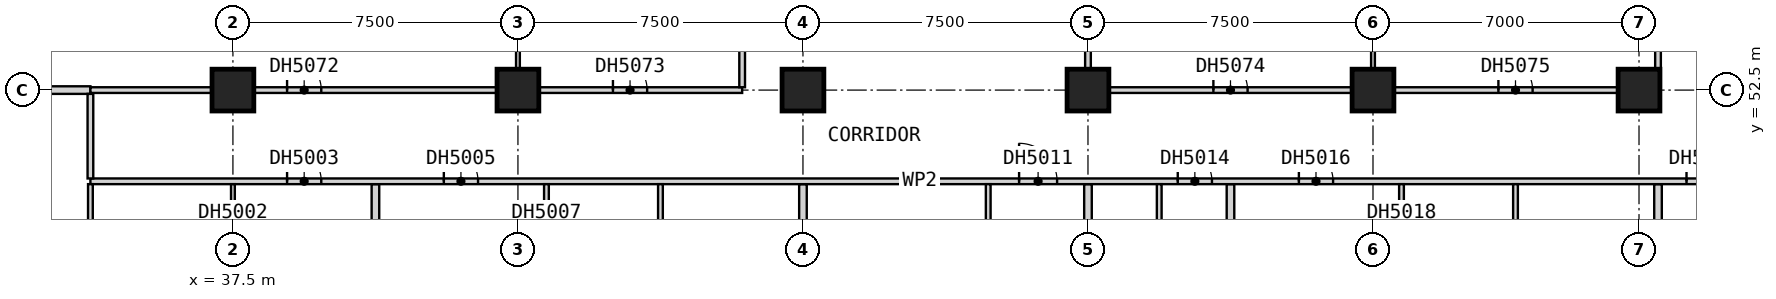
"""IFC4 building model, lengths in metres.
Left out: names, types, materials, properties, quantities, classifications, styles, units other than length and angle.
Written with IfcOpenShell. Run it as: python <this file> out.ifc"""

import sys

from ifc_helpers import new_model, si_unit, direction, frame, frame_2d, origin, origin_2d, place, context, subcontext, project, spatial, rectangle, extrude, element, fill, save


model = new_model("IFC4")
c1 = context("Model", 3, precision=1e-05, world=origin(), true_north=direction((0.0, 1.0)))
c2 = subcontext(c1, "Body", "Model", "MODEL_VIEW")
j1 = project(units=[si_unit("LENGTHUNIT", "METRE"), si_unit("PLANEANGLEUNIT", "RADIAN")], contexts=[c1])
p1 = place(None, origin())
s1 = spatial("IfcSite", under=j1, at=p1, CompositionType="ELEMENT")
p2 = place(p1, origin())
s2 = spatial("IfcBuilding", under=s1, at=p2, CompositionType="ELEMENT")
p3 = place(p2, frame((0.0, 0.0, 79.1)))
s3 = spatial("IfcBuildingStorey", under=s2, at=p3, CompositionType="ELEMENT", Elevation=79.1)
for number, where, z_axis, x_axis in (
    (1, (37.5, 52.5, 0.0), (0.0, 0.0, 1.0), (1.0, 0.0, 0.0)),
    (2, (45.0, 52.5, 0.0), (0.0, 0.0, 1.0), (1.0, 0.0, 0.0)),
    (3, (52.5, 52.5, 0.0), (0.0, 0.0, 1.0), (1.0, 0.0, 0.0)),
    (4, (60.0, 52.5, 0.0), (0.0, 0.0, 1.0), (1.0, 0.0, 0.0)),
    (5, (67.5, 52.5, 0.0), (0.0, 0.0, 1.0), (1.0, 0.0, 0.0)),
    (6, (74.5, 52.5, 0.0), (0.0, 0.0, 1.0), (1.0, 0.0, 0.0)),
):
    element("IfcColumn", number, at=place(p3, frame(where, z_axis=z_axis, x_axis=x_axis)), inside=s3, PredefinedType="COLUMN", context=c2, shape_type="SweptSolid", body=[
        extrude(rectangle(XDim=1.1, YDim=1.1, at=origin_2d()), origin(), (0.0, 0.0, 1.0), 3.6),
    ])
p4 = place(p3, frame((30.0, 52.5, 0.0), z_axis=(0.0, 0.0, 1.0), x_axis=(1.0, 0.0, 0.0)))
e7 = element("IfcWall", 7, at=p4, inside=s3, PredefinedType="PARTITIONING", context=c2, shape_type="SweptSolid", body=[
    extrude(rectangle(XDim=3.75, YDim=0.2, at=frame_2d((1.875, 0.0))), origin(), (0.0, 0.0, 1.0), 3.35),
])
p5 = place(p3, frame((41.25, 38.31, 0.0), z_axis=(0.0, 0.0, 1.0), x_axis=(0.0, 1.0, 0.0)))
e8 = element("IfcWall", 8, at=p5, inside=s3, PredefinedType="PARTITIONING", context=c2, shape_type="SweptSolid", body=[
    extrude(rectangle(XDim=11.715, YDim=0.2, at=frame_2d((5.857, 0.0))), origin(), (0.0, 0.0, 1.0), 3.35),
])
for number, where, z_axis, x_axis in (
    (9, (52.5, 37.5, 0.0), (0.0, 0.0, 1.0), (0.0, 1.0, 0.0)),
    (10, (60.0, 37.5, 0.0), (0.0, 0.0, 1.0), (0.0, 1.0, 0.0)),
):
    element("IfcWall", number, at=place(p3, frame(where, z_axis=z_axis, x_axis=x_axis)), inside=s3, PredefinedType="PARTITIONING", context=c2, shape_type="SweptSolid", body=[
        extrude(rectangle(XDim=12.525, YDim=0.2, at=frame_2d((6.262, 0.0))), origin(), (0.0, 0.0, 1.0), 3.35),
    ])
for number, where, z_axis, x_axis in (
    (11, (63.75, 38.31, 0.0), (0.0, 0.0, 1.0), (0.0, 1.0, 0.0)),
    (12, (75.0, 38.31, 0.0), (0.0, 0.0, 1.0), (0.0, 1.0, 0.0)),
):
    element("IfcWall", number, at=place(p3, frame(where, z_axis=z_axis, x_axis=x_axis)), inside=s3, PredefinedType="PARTITIONING", context=c2, shape_type="SweptSolid", body=[
        extrude(rectangle(XDim=11.715, YDim=0.2, at=frame_2d((5.857, 0.0))), origin(), (0.0, 0.0, 1.0), 3.35),
    ])
p6 = place(p3, frame((33.75, 50.1, 0.0), z_axis=(0.0, 0.0, 1.0), x_axis=(1.0, 0.0, 0.0)))
e13 = element("IfcWall", 13, at=p6, inside=s3, PredefinedType="PARTITIONING", context=c2, shape_type="SweptSolid", body=[
    extrude(rectangle(XDim=43.65, YDim=0.15, at=frame_2d((21.825, 0.0))), origin(), (0.0, 0.0, 1.0), 3.35),
])
p7 = place(p6, frame((5.175, 0.0, 0.0)))
e14 = element("IfcOpeningElement", 14, at=p7, cuts=e13, PredefinedType="OPENING", context=c2, shape_type="SweptSolid", body=[
    extrude(rectangle(XDim=0.9, YDim=2.1, at=frame_2d((0.45, 1.05))), frame((0.0, 0.085, 0.0), z_axis=(0.0, -1.0, 0.0), x_axis=(1.0, 0.0, 0.0)), (0.0, 0.0, 1.0), 0.17),
])
p8 = place(p6, frame((9.3, 0.0, 0.0)))
e15 = element("IfcOpeningElement", 15, at=p8, cuts=e13, PredefinedType="OPENING", context=c2, shape_type="SweptSolid", body=[
    extrude(rectangle(XDim=0.9, YDim=2.1, at=frame_2d((0.45, 1.05))), frame((0.0, 0.085, 0.0), z_axis=(0.0, -1.0, 0.0), x_axis=(1.0, 0.0, 0.0)), (0.0, 0.0, 1.0), 0.17),
])
p9 = place(p6, frame((24.438, 0.0, 0.0)))
e16 = element("IfcOpeningElement", 16, at=p9, cuts=e13, PredefinedType="OPENING", context=c2, shape_type="SweptSolid", body=[
    extrude(rectangle(XDim=1.0, YDim=2.1, at=frame_2d((0.5, 1.05))), frame((0.0, 0.085, 0.0), z_axis=(0.0, -1.0, 0.0), x_axis=(1.0, 0.0, 0.0)), (0.0, 0.0, 1.0), 0.17),
])
p10 = place(p6, frame((28.613, 0.0, 0.0)))
e17 = element("IfcOpeningElement", 17, at=p10, cuts=e13, PredefinedType="OPENING", context=c2, shape_type="SweptSolid", body=[
    extrude(rectangle(XDim=0.9, YDim=2.1, at=frame_2d((0.45, 1.05))), frame((0.0, 0.085, 0.0), z_axis=(0.0, -1.0, 0.0), x_axis=(1.0, 0.0, 0.0)), (0.0, 0.0, 1.0), 0.17),
])
p11 = place(p6, frame((31.8, 0.0, 0.0)))
e18 = element("IfcOpeningElement", 18, at=p11, cuts=e13, PredefinedType="OPENING", context=c2, shape_type="SweptSolid", body=[
    extrude(rectangle(XDim=0.9, YDim=2.1, at=frame_2d((0.45, 1.05))), frame((0.0, 0.085, 0.0), z_axis=(0.0, -1.0, 0.0), x_axis=(1.0, 0.0, 0.0)), (0.0, 0.0, 1.0), 0.17),
])
p12 = place(p6, frame((42.0, 0.0, 0.0)))
e19 = element("IfcOpeningElement", 19, at=p12, cuts=e13, PredefinedType="OPENING", context=c2, shape_type="SweptSolid", body=[
    extrude(rectangle(XDim=0.9, YDim=2.1, at=frame_2d((0.45, 1.05))), frame((0.0, 0.085, 0.0), z_axis=(0.0, -1.0, 0.0), x_axis=(1.0, 0.0, 0.0)), (0.0, 0.0, 1.0), 0.17),
])
p13 = place(p3, frame((33.75, 52.5, 0.0), z_axis=(0.0, 0.0, 1.0), x_axis=(1.0, 0.0, 0.0)))
e20 = element("IfcWall", 20, at=p13, inside=s3, PredefinedType="PARTITIONING", context=c2, shape_type="SweptSolid", body=[
    extrude(rectangle(XDim=17.15, YDim=0.15, at=frame_2d((8.575, 0.0))), origin(), (0.0, 0.0, 1.0), 3.35),
])
p14 = place(p13, frame((5.175, 0.0, 0.0)))
e21 = element("IfcOpeningElement", 21, at=p14, cuts=e20, PredefinedType="OPENING", context=c2, shape_type="SweptSolid", body=[
    extrude(rectangle(XDim=0.9, YDim=2.1, at=frame_2d((0.45, 1.05))), frame((0.0, 0.085, 0.0), z_axis=(0.0, -1.0, 0.0), x_axis=(1.0, 0.0, 0.0)), (0.0, 0.0, 1.0), 0.17),
])
p15 = place(p13, frame((13.75, 0.0, 0.0)))
e22 = element("IfcOpeningElement", 22, at=p15, cuts=e20, PredefinedType="OPENING", context=c2, shape_type="SweptSolid", body=[
    extrude(rectangle(XDim=0.9, YDim=2.1, at=frame_2d((0.45, 1.05))), frame((0.0, 0.085, 0.0), z_axis=(0.0, -1.0, 0.0), x_axis=(1.0, 0.0, 0.0)), (0.0, 0.0, 1.0), 0.17),
])
p16 = place(p3, frame((60.0, 52.5, 0.0), z_axis=(0.0, 0.0, 1.0), x_axis=(1.0, 0.0, 0.0)))
e23 = element("IfcWall", 23, at=p16, inside=s3, PredefinedType="PARTITIONING", context=c2, shape_type="SweptSolid", body=[
    extrude(rectangle(XDim=15.0, YDim=0.15, at=frame_2d((7.5, 0.0))), origin(), (0.0, 0.0, 1.0), 3.35),
])
p17 = place(p16, frame((3.3, 0.0, 0.0)))
e24 = element("IfcOpeningElement", 24, at=p17, cuts=e23, PredefinedType="OPENING", context=c2, shape_type="SweptSolid", body=[
    extrude(rectangle(XDim=0.9, YDim=2.1, at=frame_2d((0.45, 1.05))), frame((0.0, 0.085, 0.0), z_axis=(0.0, -1.0, 0.0), x_axis=(1.0, 0.0, 0.0)), (0.0, 0.0, 1.0), 0.17),
])
p18 = place(p16, frame((10.8, 0.0, 0.0)))
e25 = element("IfcOpeningElement", 25, at=p18, cuts=e23, PredefinedType="OPENING", context=c2, shape_type="SweptSolid", body=[
    extrude(rectangle(XDim=0.9, YDim=2.1, at=frame_2d((0.45, 1.05))), frame((0.0, 0.085, 0.0), z_axis=(0.0, -1.0, 0.0), x_axis=(1.0, 0.0, 0.0)), (0.0, 0.0, 1.0), 0.17),
])
p19 = place(p3, frame((33.75, 50.175, 0.0), z_axis=(0.0, 0.0, 1.0), x_axis=(0.0, 1.0, 0.0)))
e26 = element("IfcWall", 26, at=p19, inside=s3, PredefinedType="PARTITIONING", context=c2, shape_type="SweptSolid", body=[
    extrude(rectangle(XDim=2.225, YDim=0.15, at=frame_2d((1.112, 0.0))), origin(), (0.0, 0.0, 1.0), 3.35),
])
p20 = place(p3, frame((75.0, 52.575, 0.0), z_axis=(0.0, 0.0, 1.0), x_axis=(0.0, 1.0, 0.0)))
e27 = element("IfcWall", 27, at=p20, inside=s3, PredefinedType="PARTITIONING", context=c2, shape_type="SweptSolid", body=[
    extrude(rectangle(XDim=11.85, YDim=0.15, at=frame_2d((5.925, 0.0))), origin(), (0.0, 0.0, 1.0), 3.35),
])
p21 = place(p20, frame((9.225, 0.0, 0.0)))
e28 = element("IfcOpeningElement", 28, at=p21, cuts=e27, PredefinedType="OPENING", context=c2, shape_type="SweptSolid", body=[
    extrude(rectangle(XDim=0.9, YDim=2.1, at=frame_2d((0.45, 1.05))), frame((0.0, 0.085, 0.0), z_axis=(0.0, -1.0, 0.0), x_axis=(1.0, 0.0, 0.0)), (0.0, 0.0, 1.0), 0.17),
])
p22 = place(p3, frame((37.5, 45.3, 0.0), z_axis=(0.0, 0.0, 1.0), x_axis=(0.0, 1.0, 0.0)))
e29 = element("IfcWall", 29, at=p22, inside=s3, PredefinedType="PARTITIONING", context=c2, shape_type="SweptSolid", body=[
    extrude(rectangle(XDim=4.725, YDim=0.1, at=frame_2d((2.362, 0.0))), origin(), (0.0, 0.0, 1.0), 3.35),
])
p23 = place(p22, frame((1.925, 0.0, 0.0)))
e30 = element("IfcOpeningElement", 30, at=p23, cuts=e29, PredefinedType="OPENING", context=c2, shape_type="SweptSolid", body=[
    extrude(rectangle(XDim=0.9, YDim=2.1, at=frame_2d((0.45, 1.05))), frame((0.0, 0.06, 0.0), z_axis=(0.0, -1.0, 0.0), x_axis=(1.0, 0.0, 0.0)), (0.0, 0.0, 1.0), 0.12),
])
p24 = place(p3, frame((45.0, 52.575, 0.0), z_axis=(0.0, 0.0, 1.0), x_axis=(0.0, 1.0, 0.0)))
e31 = element("IfcWall", 31, at=p24, inside=s3, PredefinedType="PARTITIONING", context=c2, shape_type="SweptSolid", body=[
    extrude(rectangle(XDim=7.425, YDim=0.1, at=frame_2d((3.712, 0.0))), origin(), (0.0, 0.0, 1.0), 3.35),
])
p25 = place(p3, frame((67.5, 52.575, 0.0), z_axis=(0.0, 0.0, 1.0), x_axis=(0.0, 1.0, 0.0)))
e32 = element("IfcWall", 32, at=p25, inside=s3, PredefinedType="PARTITIONING", context=c2, shape_type="SweptSolid", body=[
    extrude(rectangle(XDim=7.375, YDim=0.1, at=frame_2d((3.688, 0.0))), origin(), (0.0, 0.0, 1.0), 3.35),
])
p26 = place(p3, frame((33.75, 45.312, 0.0), z_axis=(0.0, 0.0, 1.0), x_axis=(0.0, 1.0, 0.0)))
e33 = element("IfcWall", 33, at=p26, inside=s3, PredefinedType="PARTITIONING", context=c2, shape_type="SweptSolid", body=[
    extrude(rectangle(XDim=4.712, YDim=0.125, at=frame_2d((2.356, 0.0))), origin(), (0.0, 0.0, 1.0), 3.35),
])
p27 = place(p3, frame((45.75, 45.312, 0.0), z_axis=(0.0, 0.0, 1.0), x_axis=(0.0, 1.0, 0.0)))
e34 = element("IfcWall", 34, at=p27, inside=s3, PredefinedType="PARTITIONING", context=c2, shape_type="SweptSolid", body=[
    extrude(rectangle(XDim=4.712, YDim=0.125, at=frame_2d((2.356, 0.0))), origin(), (0.0, 0.0, 1.0), 3.35),
])
p28 = place(p27, frame((1.913, 0.0, 0.0)))
e35 = element("IfcOpeningElement", 35, at=p28, cuts=e34, PredefinedType="OPENING", context=c2, shape_type="SweptSolid", body=[
    extrude(rectangle(XDim=0.9, YDim=2.1, at=frame_2d((0.45, 1.05))), frame((0.0, 0.073, 0.0), z_axis=(0.0, -1.0, 0.0), x_axis=(1.0, 0.0, 0.0)), (0.0, 0.0, 1.0), 0.145),
])
for number, where, z_axis, x_axis in (
    (36, (48.75, 45.312, 0.0), (0.0, 0.0, 1.0), (0.0, 1.0, 0.0)),
    (37, (57.375, 45.312, 0.0), (0.0, 0.0, 1.0), (0.0, 1.0, 0.0)),
    (38, (61.875, 45.312, 0.0), (0.0, 0.0, 1.0), (0.0, 1.0, 0.0)),
):
    element("IfcWall", number, at=place(p3, frame(where, z_axis=z_axis, x_axis=x_axis)), inside=s3, PredefinedType="PARTITIONING", context=c2, shape_type="SweptSolid", body=[
        extrude(rectangle(XDim=4.712, YDim=0.125, at=frame_2d((2.356, 0.0))), origin(), (0.0, 0.0, 1.0), 3.35),
    ])
p29 = place(p3, frame((68.25, 45.312, 0.0), z_axis=(0.0, 0.0, 1.0), x_axis=(0.0, 1.0, 0.0)))
e39 = element("IfcWall", 39, at=p29, inside=s3, PredefinedType="PARTITIONING", context=c2, shape_type="SweptSolid", body=[
    extrude(rectangle(XDim=4.712, YDim=0.125, at=frame_2d((2.356, 0.0))), origin(), (0.0, 0.0, 1.0), 3.35),
])
p30 = place(p29, frame((1.913, 0.0, 0.0)))
e40 = element("IfcOpeningElement", 40, at=p30, cuts=e39, PredefinedType="OPENING", context=c2, shape_type="SweptSolid", body=[
    extrude(rectangle(XDim=0.9, YDim=2.1, at=frame_2d((0.45, 1.05))), frame((0.0, 0.073, 0.0), z_axis=(0.0, -1.0, 0.0), x_axis=(1.0, 0.0, 0.0)), (0.0, 0.0, 1.0), 0.145),
])
p31 = place(p3, frame((71.25, 45.312, 0.0), z_axis=(0.0, 0.0, 1.0), x_axis=(0.0, 1.0, 0.0)))
e41 = element("IfcWall", 41, at=p31, inside=s3, PredefinedType="PARTITIONING", context=c2, shape_type="SweptSolid", body=[
    extrude(rectangle(XDim=4.712, YDim=0.125, at=frame_2d((2.356, 0.0))), origin(), (0.0, 0.0, 1.0), 3.35),
])
for number, where, z_axis, x_axis in (
    (42, (50.9, 52.575, 0.0), (0.0, 0.0, 1.0), (0.0, 1.0, 0.0)),
    (43, (60.0, 52.575, 0.0), (0.0, 0.0, 1.0), (0.0, 1.0, 0.0)),
):
    element("IfcWall", number, at=place(p3, frame(where, z_axis=z_axis, x_axis=x_axis)), inside=s3, PredefinedType="PARTITIONING", context=c2, shape_type="SweptSolid", body=[
        extrude(rectangle(XDim=7.425, YDim=0.15, at=frame_2d((3.712, 0.0))), origin(), (0.0, 0.0, 1.0), 3.35),
    ])
p32 = place(p7, origin())
e44 = element("IfcDoor", 44, at=p32, inside=s3, OperationType="SINGLE_SWING_RIGHT", PredefinedType="DOOR", context=c2, shape_type="SweptSolid", body=[
    extrude(rectangle(XDim=0.9, YDim=2.1, at=frame_2d((0.45, 1.05))), frame((0.0, 0.025, 0.0), z_axis=(0.0, -1.0, 0.0), x_axis=(1.0, 0.0, 0.0)), (0.0, 0.0, 1.0), 0.05),
])
fill(e14, e44)
p33 = place(p8, origin())
e45 = element("IfcDoor", 45, at=p33, inside=s3, OperationType="SINGLE_SWING_RIGHT", PredefinedType="DOOR", context=c2, shape_type="SweptSolid", body=[
    extrude(rectangle(XDim=0.9, YDim=2.1, at=frame_2d((0.45, 1.05))), frame((0.0, 0.025, 0.0), z_axis=(0.0, -1.0, 0.0), x_axis=(1.0, 0.0, 0.0)), (0.0, 0.0, 1.0), 0.05),
])
fill(e15, e45)
p34 = place(p9, origin())
e46 = element("IfcDoor", 46, at=p34, inside=s3, OperationType="SINGLE_SWING_RIGHT", PredefinedType="DOOR", context=c2, shape_type="SweptSolid", body=[
    extrude(rectangle(XDim=1.0, YDim=2.1, at=frame_2d((0.5, 1.05))), frame((0.0, 0.025, 0.0), z_axis=(0.0, -1.0, 0.0), x_axis=(1.0, 0.0, 0.0)), (0.0, 0.0, 1.0), 0.05),
])
fill(e16, e46)
p35 = place(p10, origin())
e47 = element("IfcDoor", 47, at=p35, inside=s3, OperationType="SINGLE_SWING_RIGHT", PredefinedType="DOOR", context=c2, shape_type="SweptSolid", body=[
    extrude(rectangle(XDim=0.9, YDim=2.1, at=frame_2d((0.45, 1.05))), frame((0.0, 0.025, 0.0), z_axis=(0.0, -1.0, 0.0), x_axis=(1.0, 0.0, 0.0)), (0.0, 0.0, 1.0), 0.05),
])
fill(e17, e47)
p36 = place(p11, origin())
e48 = element("IfcDoor", 48, at=p36, inside=s3, OperationType="SINGLE_SWING_RIGHT", PredefinedType="DOOR", context=c2, shape_type="SweptSolid", body=[
    extrude(rectangle(XDim=0.9, YDim=2.1, at=frame_2d((0.45, 1.05))), frame((0.0, 0.025, 0.0), z_axis=(0.0, -1.0, 0.0), x_axis=(1.0, 0.0, 0.0)), (0.0, 0.0, 1.0), 0.05),
])
fill(e18, e48)
p37 = place(p12, origin())
e49 = element("IfcDoor", 49, at=p37, inside=s3, OperationType="SINGLE_SWING_LEFT", PredefinedType="DOOR", context=c2, shape_type="SweptSolid", body=[
    extrude(rectangle(XDim=0.9, YDim=2.1, at=frame_2d((0.45, 1.05))), frame((0.0, 0.025, 0.0), z_axis=(0.0, -1.0, 0.0), x_axis=(1.0, 0.0, 0.0)), (0.0, 0.0, 1.0), 0.05),
])
fill(e19, e49)
p38 = place(p14, origin())
e50 = element("IfcDoor", 50, at=p38, inside=s3, OperationType="SINGLE_SWING_LEFT", PredefinedType="DOOR", context=c2, shape_type="SweptSolid", body=[
    extrude(rectangle(XDim=0.9, YDim=2.1, at=frame_2d((0.45, 1.05))), frame((0.0, 0.025, 0.0), z_axis=(0.0, -1.0, 0.0), x_axis=(1.0, 0.0, 0.0)), (0.0, 0.0, 1.0), 0.05),
])
fill(e21, e50)
p39 = place(p15, origin())
e51 = element("IfcDoor", 51, at=p39, inside=s3, OperationType="SINGLE_SWING_LEFT", PredefinedType="DOOR", context=c2, shape_type="SweptSolid", body=[
    extrude(rectangle(XDim=0.9, YDim=2.1, at=frame_2d((0.45, 1.05))), frame((0.0, 0.025, 0.0), z_axis=(0.0, -1.0, 0.0), x_axis=(1.0, 0.0, 0.0)), (0.0, 0.0, 1.0), 0.05),
])
fill(e22, e51)
p40 = place(p17, origin())
e52 = element("IfcDoor", 52, at=p40, inside=s3, OperationType="SINGLE_SWING_LEFT", PredefinedType="DOOR", context=c2, shape_type="SweptSolid", body=[
    extrude(rectangle(XDim=0.9, YDim=2.1, at=frame_2d((0.45, 1.05))), frame((0.0, 0.025, 0.0), z_axis=(0.0, -1.0, 0.0), x_axis=(1.0, 0.0, 0.0)), (0.0, 0.0, 1.0), 0.05),
])
fill(e24, e52)
p41 = place(p18, origin())
e53 = element("IfcDoor", 53, at=p41, inside=s3, OperationType="SINGLE_SWING_LEFT", PredefinedType="DOOR", context=c2, shape_type="SweptSolid", body=[
    extrude(rectangle(XDim=0.9, YDim=2.1, at=frame_2d((0.45, 1.05))), frame((0.0, 0.025, 0.0), z_axis=(0.0, -1.0, 0.0), x_axis=(1.0, 0.0, 0.0)), (0.0, 0.0, 1.0), 0.05),
])
fill(e25, e53)
save(model, sys.argv[1])
